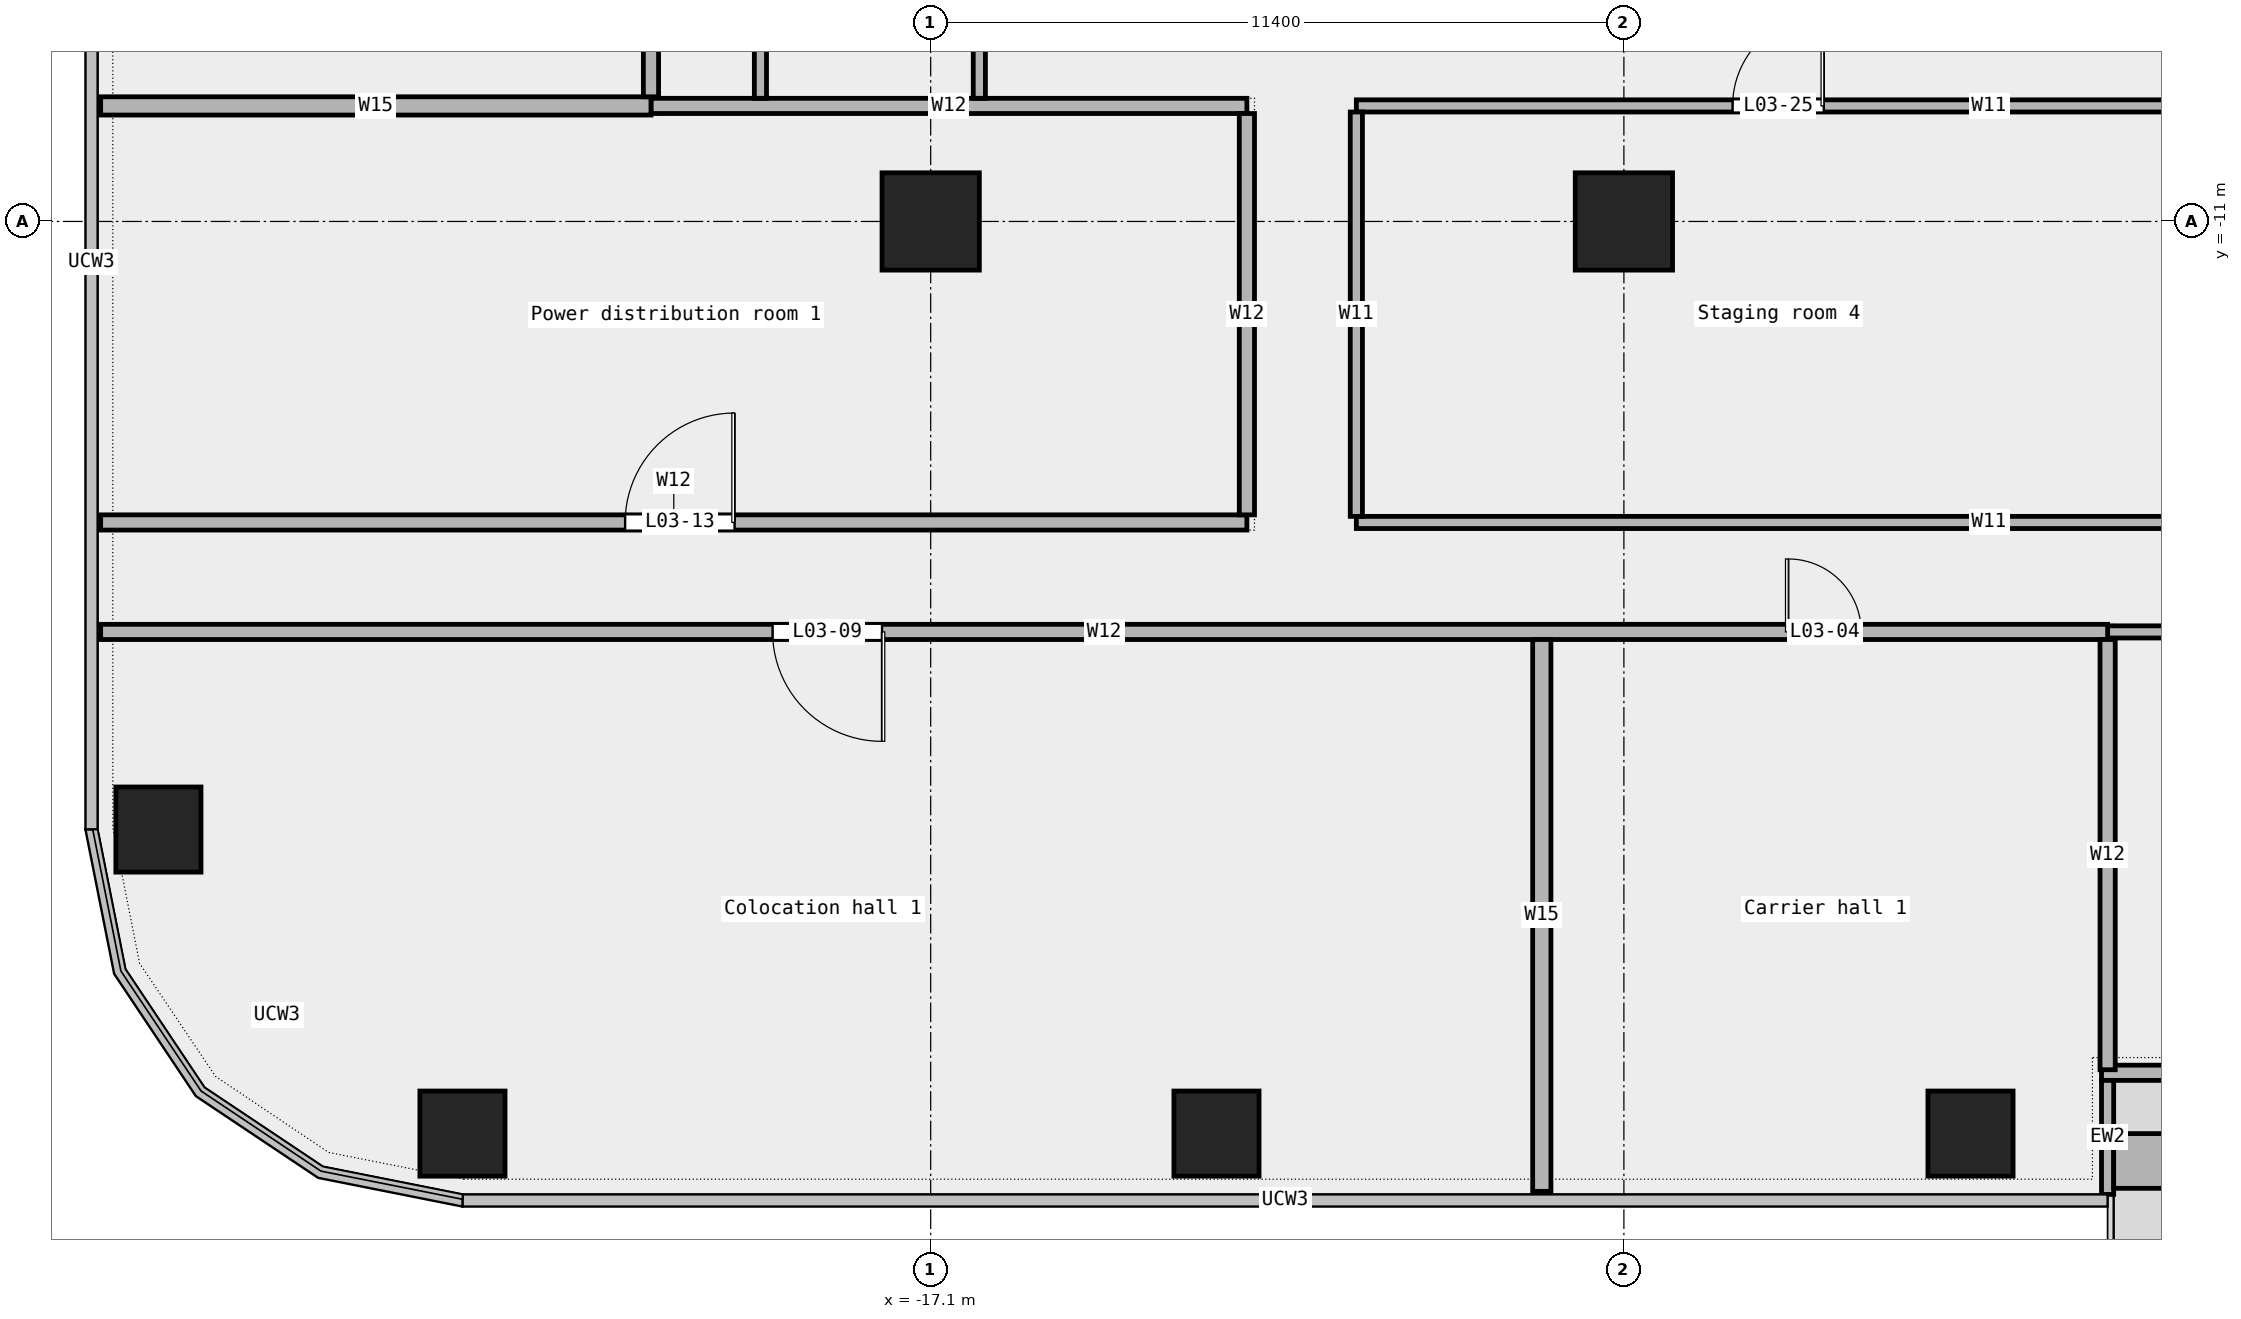
"""IFC4 building model, lengths in metres.
Left out: names, types, materials, properties, quantities, classifications, styles, units other than length and angle.
Written with IfcOpenShell. Run it as: python <this file> out.ifc"""

import sys

from ifc_helpers import new_model, si_unit, direction, frame, frame_2d, origin, origin_2d, place, context, subcontext, project, spatial, rectangle, extrude, element, fill, save


model = new_model("IFC4")
c1 = context("Model", 3, precision=1e-05, world=origin(), true_north=direction((0.0, 1.0)))
c2 = subcontext(c1, "Body", "Model", "MODEL_VIEW")
j1 = project(units=[si_unit("LENGTHUNIT", "METRE"), si_unit("PLANEANGLEUNIT", "RADIAN")], contexts=[c1])
p1 = place(None, origin())
s1 = spatial("IfcSite", under=j1, at=p1, CompositionType="ELEMENT")
p2 = place(p1, origin())
s2 = spatial("IfcBuilding", under=s1, at=p2, CompositionType="ELEMENT")
p3 = place(p2, frame((0.0, 0.0, 20.0)))
s3 = spatial("IfcBuildingStorey", under=s2, at=p3, CompositionType="ELEMENT", Elevation=20.0)
for number, where, z_axis, x_axis in (
    (1, (-24.8, -26.0, 0.0), (0.0, 0.0, 1.0), (1.0, 0.0, 0.0)),
    (2, (-12.4, -26.0, 0.0), (0.0, 0.0, 1.0), (1.0, 0.0, 0.0)),
    (3, (0.0, -26.0, 0.0), (0.0, 0.0, 1.0), (1.0, 0.0, 0.0)),
    (4, (-29.8, -21.0, 0.0), (0.0, 0.0, 1.0), (1.0, 0.0, 0.0)),
):
    element("IfcColumn", number, at=place(p3, frame(where, z_axis=z_axis, x_axis=x_axis)), inside=s3, PredefinedType="COLUMN", context=c2, shape_type="SweptSolid", body=[
        extrude(rectangle(XDim=1.4, YDim=1.4, at=origin_2d()), origin(), (0.0, 0.0, 1.0), 5.0),
    ])
for number, where, z_axis, x_axis in (
    (5, (-17.1, -11.0, 0.0), (0.0, 0.0, 1.0), (1.0, 0.0, 0.0)),
    (6, (-5.7, -11.0, 0.0), (0.0, 0.0, 1.0), (1.0, 0.0, 0.0)),
):
    element("IfcColumn", number, at=place(p3, frame(where, z_axis=z_axis, x_axis=x_axis)), inside=s3, PredefinedType="COLUMN", context=c2, shape_type="SweptSolid", body=[
        extrude(rectangle(XDim=1.6, YDim=1.6, at=origin_2d()), origin(), (0.0, 0.0, 1.0), 5.0),
    ])
p4 = place(p3, frame((2.155, -25.0, 0.0), z_axis=(0.0, 0.0, 1.0), x_axis=(1.0, 0.0, 0.0)))
e7 = element("IfcWall", 7, at=p4, inside=s3, PredefinedType="STANDARD", context=c2, shape_type="SweptSolid", body=[
    extrude(rectangle(XDim=13.727, YDim=0.25, at=frame_2d((6.864, 0.0))), origin(), (0.0, 0.0, 1.0), 5.0),
])
p5 = place(p4, frame((1.75, 0.0, 0.45)))
e8 = element("IfcOpeningElement", 8, at=p5, cuts=e7, PredefinedType="OPENING", context=c2, shape_type="SweptSolid", body=[
    extrude(rectangle(XDim=1.5, YDim=3.0, at=frame_2d((0.75, 1.5))), frame((0.0, 0.137, 0.0), z_axis=(0.0, -1.0, 0.0), x_axis=(1.0, 0.0, 0.0)), (0.0, 0.0, 1.0), 0.274),
])
p6 = place(p4, frame((6.0, 0.0, 0.0)))
e9 = element("IfcOpeningElement", 9, at=p6, cuts=e7, PredefinedType="OPENING", context=c2, shape_type="SweptSolid", body=[
    extrude(rectangle(XDim=1.8, YDim=2.4, at=frame_2d((0.9, 1.2))), frame((0.0, 0.137, 0.0), z_axis=(0.0, -1.0, 0.0), x_axis=(1.0, 0.0, 0.0)), (0.0, 0.0, 1.0), 0.274),
])
p7 = place(p4, frame((11.25, 0.0, 0.45)))
e10 = element("IfcOpeningElement", 10, at=p7, cuts=e7, PredefinedType="OPENING", context=c2, shape_type="SweptSolid", body=[
    extrude(rectangle(XDim=1.5, YDim=3.0, at=frame_2d((0.75, 1.5))), frame((0.0, 0.137, 0.0), z_axis=(0.0, -1.0, 0.0), x_axis=(1.0, 0.0, 0.0)), (0.0, 0.0, 1.0), 0.274),
])
p8 = place(p3, frame((2.255, -27.0, 0.0), z_axis=(0.0, 0.0, 1.0), x_axis=(0.0, 1.0, 0.0)))
e11 = element("IfcWall", 11, at=p8, inside=s3, PredefinedType="STANDARD", context=c2, shape_type="SweptSolid", body=[
    extrude(rectangle(XDim=1.875, YDim=0.2, at=frame_2d((0.938, 0.0))), origin(), (0.0, 0.0, 1.0), 5.0),
])
p9 = place(p3, frame((2.354, -26.45, 0.0), z_axis=(0.0, 0.0, 1.0), x_axis=(1.0, 0.0, 0.0)))
e12 = element("IfcWall", 12, at=p9, inside=s3, PredefinedType="STANDARD", context=c2, shape_type="SweptSolid", body=[
    extrude(rectangle(XDim=3.6, YDim=0.9, at=frame_2d((1.8, 0.0))), origin(), (0.0, 0.0, 1.0), 0.7),
])
p10 = place(p3, frame((2.255, -17.75, 0.0), z_axis=(0.0, 0.0, 1.0), x_axis=(1.0, 0.0, 0.0)))
e13 = element("IfcWall", 13, at=p10, inside=s3, PredefinedType="PARTITIONING", context=c2, shape_type="SweptSolid", body=[
    extrude(rectangle(XDim=13.525, YDim=0.2, at=frame_2d((6.763, 0.0))), origin(), (0.0, 0.0, 1.0), 5.0),
])
p11 = place(p10, frame((6.012, 0.0, 0.0)))
e14 = element("IfcOpeningElement", 14, at=p11, cuts=e13, PredefinedType="OPENING", context=c2, shape_type="SweptSolid", body=[
    extrude(rectangle(XDim=1.5, YDim=2.1, at=frame_2d((0.75, 1.05))), frame((0.0, 0.112, 0.0), z_axis=(0.0, -1.0, 0.0), x_axis=(1.0, 0.0, 0.0)), (0.0, 0.0, 1.0), 0.224),
])
p12 = place(p3, frame((-30.75, -17.75, 0.0), z_axis=(0.0, 0.0, 1.0), x_axis=(1.0, 0.0, 0.0)))
e15 = element("IfcWall", 15, at=p12, inside=s3, PredefinedType="PARTITIONING", context=c2, shape_type="SweptSolid", body=[
    extrude(rectangle(XDim=33.005, YDim=0.25, at=frame_2d((16.502, 0.0))), origin(), (0.0, 0.0, 1.0), 5.0),
])
p13 = place(p12, frame((27.752, 0.0, 0.0)))
e16 = element("IfcOpeningElement", 16, at=p13, cuts=e15, PredefinedType="OPENING", context=c2, shape_type="SweptSolid", body=[
    extrude(rectangle(XDim=1.2, YDim=2.1, at=frame_2d((0.6, 1.05))), frame((0.0, 0.137, 0.0), z_axis=(0.0, -1.0, 0.0), x_axis=(1.0, 0.0, 0.0)), (0.0, 0.0, 1.0), 0.274),
])
p14 = place(p12, frame((11.05, 0.0, 0.0)))
e17 = element("IfcOpeningElement", 17, at=p14, cuts=e15, PredefinedType="OPENING", context=c2, shape_type="SweptSolid", body=[
    extrude(rectangle(XDim=1.8, YDim=2.1, at=frame_2d((0.9, 1.05))), frame((0.0, 0.137, 0.0), z_axis=(0.0, -1.0, 0.0), x_axis=(1.0, 0.0, 0.0)), (0.0, 0.0, 1.0), 0.274),
])
p15 = place(p3, frame((-10.1, -15.95, 0.0), z_axis=(0.0, 0.0, 1.0), x_axis=(1.0, 0.0, 0.0)))
e18 = element("IfcWall", 18, at=p15, inside=s3, PredefinedType="PARTITIONING", context=c2, shape_type="SweptSolid", body=[
    extrude(rectangle(XDim=20.81, YDim=0.2, at=frame_2d((10.405, 0.0))), origin(), (0.0, 0.0, 1.0), 5.0),
])
p16 = place(p3, frame((-30.75, -15.95, 0.0), z_axis=(0.0, 0.0, 1.0), x_axis=(1.0, 0.0, 0.0)))
e19 = element("IfcWall", 19, at=p16, inside=s3, PredefinedType="PARTITIONING", context=c2, shape_type="SweptSolid", body=[
    extrude(rectangle(XDim=18.85, YDim=0.25, at=frame_2d((9.425, 0.0))), origin(), (0.0, 0.0, 1.0), 5.0),
])
p17 = place(p16, frame((8.625, 0.0, 0.0)))
e20 = element("IfcOpeningElement", 20, at=p17, cuts=e19, PredefinedType="OPENING", context=c2, shape_type="SweptSolid", body=[
    extrude(rectangle(XDim=1.8, YDim=2.1, at=frame_2d((0.9, 1.05))), frame((0.0, 0.137, 0.0), z_axis=(0.0, -1.0, 0.0), x_axis=(1.0, 0.0, 0.0)), (0.0, 0.0, 1.0), 0.274),
])
p18 = place(p3, frame((-10.1, -9.1, 0.0), z_axis=(0.0, 0.0, 1.0), x_axis=(1.0, 0.0, 0.0)))
e21 = element("IfcWall", 21, at=p18, inside=s3, PredefinedType="PARTITIONING", context=c2, shape_type="SweptSolid", body=[
    extrude(rectangle(XDim=20.81, YDim=0.2, at=frame_2d((10.405, 0.0))), origin(), (0.0, 0.0, 1.0), 5.0),
])
p19 = place(p18, frame((16.742, 0.0, 0.0)))
e22 = element("IfcOpeningElement", 22, at=p19, cuts=e21, PredefinedType="OPENING", context=c2, shape_type="SweptSolid", body=[
    extrude(rectangle(XDim=1.2, YDim=2.1, at=frame_2d((0.6, 1.05))), frame((0.0, 0.112, 0.0), z_axis=(0.0, -1.0, 0.0), x_axis=(1.0, 0.0, 0.0)), (0.0, 0.0, 1.0), 0.224),
])
p20 = place(p18, frame((6.188, 0.0, 0.0)))
e23 = element("IfcOpeningElement", 23, at=p20, cuts=e21, PredefinedType="OPENING", context=c2, shape_type="SweptSolid", body=[
    extrude(rectangle(XDim=1.5, YDim=2.1, at=frame_2d((0.75, 1.05))), frame((0.0, 0.112, 0.0), z_axis=(0.0, -1.0, 0.0), x_axis=(1.0, 0.0, 0.0)), (0.0, 0.0, 1.0), 0.224),
])
p21 = place(p3, frame((-21.7, -9.1, 0.0), z_axis=(0.0, 0.0, 1.0), x_axis=(1.0, 0.0, 0.0)))
e24 = element("IfcWall", 24, at=p21, inside=s3, PredefinedType="PARTITIONING", context=c2, shape_type="SweptSolid", body=[
    extrude(rectangle(XDim=9.8, YDim=0.25, at=frame_2d((4.9, 0.0))), origin(), (0.0, 0.0, 1.0), 5.0),
])
p22 = place(p3, frame((-30.75, -9.1, 0.0), z_axis=(0.0, 0.0, 1.0), x_axis=(1.0, 0.0, 0.0)))
e25 = element("IfcWall", 25, at=p22, inside=s3, PredefinedType="PARTITIONING", context=c2, shape_type="SweptSolid", body=[
    extrude(rectangle(XDim=9.05, YDim=0.3, at=frame_2d((4.525, 0.0))), origin(), (0.0, 0.0, 1.0), 5.0),
])
p23 = place(p3, frame((-21.7, -8.95, 0.0), z_axis=(0.0, 0.0, 1.0), x_axis=(0.0, 1.0, 0.0)))
e26 = element("IfcWall", 26, at=p23, inside=s3, PredefinedType="PARTITIONING", context=c2, shape_type="SweptSolid", body=[
    extrude(rectangle(XDim=6.49, YDim=0.25, at=frame_2d((3.245, 0.0))), origin(), (0.0, 0.0, 1.0), 5.0),
])
p24 = place(p23, frame((2.645, 0.0, 0.0)))
e27 = element("IfcOpeningElement", 27, at=p24, cuts=e26, PredefinedType="OPENING", context=c2, shape_type="SweptSolid", body=[
    extrude(rectangle(XDim=1.2, YDim=2.1, at=frame_2d((0.6, 1.05))), frame((0.0, 0.137, 0.0), z_axis=(0.0, -1.0, 0.0), x_axis=(1.0, 0.0, 0.0)), (0.0, 0.0, 1.0), 0.274),
])
p25 = place(p3, frame((-19.9, -8.975, 0.0), z_axis=(0.0, 0.0, 1.0), x_axis=(0.0, 1.0, 0.0)))
e28 = element("IfcWall", 28, at=p25, inside=s3, PredefinedType="PARTITIONING", context=c2, shape_type="SweptSolid", body=[
    extrude(rectangle(XDim=5.425, YDim=0.2, at=frame_2d((2.712, 0.0))), origin(), (0.0, 0.0, 1.0), 5.0),
])
p26 = place(p3, frame((-16.3, -8.975, 0.0), z_axis=(0.0, 0.0, 1.0), x_axis=(0.0, 1.0, 0.0)))
e29 = element("IfcWall", 29, at=p26, inside=s3, PredefinedType="PARTITIONING", context=c2, shape_type="SweptSolid", body=[
    extrude(rectangle(XDim=5.425, YDim=0.2, at=frame_2d((2.712, 0.0))), origin(), (0.0, 0.0, 1.0), 5.0),
])
p27 = place(p26, frame((2.262, 0.0, 0.0)))
e30 = element("IfcOpeningElement", 30, at=p27, cuts=e29, PredefinedType="OPENING", context=c2, shape_type="SweptSolid", body=[
    extrude(rectangle(XDim=0.9, YDim=2.1, at=frame_2d((0.45, 1.05))), frame((0.0, 0.112, 0.0), z_axis=(0.0, -1.0, 0.0), x_axis=(1.0, 0.0, 0.0)), (0.0, 0.0, 1.0), 0.224),
])
p28 = place(p3, frame((-11.9, -15.825, 0.0), z_axis=(0.0, 0.0, 1.0), x_axis=(0.0, 1.0, 0.0)))
e31 = element("IfcWall", 31, at=p28, inside=s3, PredefinedType="PARTITIONING", context=c2, shape_type="SweptSolid", body=[
    extrude(rectangle(XDim=6.6, YDim=0.25, at=frame_2d((3.3, 0.0))), origin(), (0.0, 0.0, 1.0), 5.0),
])
p29 = place(p3, frame((-10.1, -15.85, 0.0), z_axis=(0.0, 0.0, 1.0), x_axis=(0.0, 1.0, 0.0)))
e32 = element("IfcWall", 32, at=p29, inside=s3, PredefinedType="PARTITIONING", context=c2, shape_type="SweptSolid", body=[
    extrude(rectangle(XDim=6.65, YDim=0.2, at=frame_2d((3.325, 0.0))), origin(), (0.0, 0.0, 1.0), 5.0),
])
p30 = place(p3, frame((-7.05, -26.95, 0.0), z_axis=(0.0, 0.0, 1.0), x_axis=(0.0, 1.0, 0.0)))
e33 = element("IfcWall", 33, at=p30, inside=s3, PredefinedType="PARTITIONING", context=c2, shape_type="SweptSolid", body=[
    extrude(rectangle(XDim=9.075, YDim=0.3, at=frame_2d((4.538, 0.0))), origin(), (0.0, 0.0, 1.0), 5.0),
])
p31 = place(p3, frame((2.255, -24.95, 0.0), z_axis=(0.0, 0.0, 1.0), x_axis=(0.0, 1.0, 0.0)))
e34 = element("IfcWall", 34, at=p31, inside=s3, PredefinedType="PARTITIONING", context=c2, shape_type="SweptSolid", body=[
    extrude(rectangle(XDim=7.075, YDim=0.25, at=frame_2d((3.538, 0.0))), origin(), (0.0, 0.0, 1.0), 5.0),
])
p32 = place(p13, origin())
e35 = element("IfcDoor", 35, at=p32, inside=s3, OperationType="SINGLE_SWING_LEFT", PredefinedType="DOOR", context=c2, shape_type="SweptSolid", body=[
    extrude(rectangle(XDim=1.2, YDim=2.1, at=frame_2d((0.6, 1.05))), frame((0.0, 0.025, 0.0), z_axis=(0.0, -1.0, 0.0), x_axis=(1.0, 0.0, 0.0)), (0.0, 0.0, 1.0), 0.05),
])
fill(e16, e35)
p33 = place(p14, origin())
e36 = element("IfcDoor", 36, at=p33, inside=s3, OperationType="DOUBLE_DOOR_SINGLE_SWING", PredefinedType="DOOR", context=c2, shape_type="SweptSolid", body=[
    extrude(rectangle(XDim=1.8, YDim=2.1, at=frame_2d((0.9, 1.05))), frame((0.0, 0.025, 0.0), z_axis=(0.0, -1.0, 0.0), x_axis=(1.0, 0.0, 0.0)), (0.0, 0.0, 1.0), 0.05),
])
fill(e17, e36)
p34 = place(p17, origin())
e37 = element("IfcDoor", 37, at=p34, inside=s3, OperationType="DOUBLE_DOOR_SINGLE_SWING", PredefinedType="DOOR", context=c2, shape_type="SweptSolid", body=[
    extrude(rectangle(XDim=1.8, YDim=2.1, at=frame_2d((0.9, 1.05))), frame((0.0, 0.025, 0.0), z_axis=(0.0, -1.0, 0.0), x_axis=(1.0, 0.0, 0.0)), (0.0, 0.0, 1.0), 0.05),
])
fill(e20, e37)
p35 = place(p20, origin())
e38 = element("IfcDoor", 38, at=p35, inside=s3, OperationType="DOUBLE_DOOR_SINGLE_SWING", PredefinedType="DOOR", context=c2, shape_type="SweptSolid", body=[
    extrude(rectangle(XDim=1.5, YDim=2.1, at=frame_2d((0.75, 1.05))), frame((0.0, 0.025, 0.0), z_axis=(0.0, -1.0, 0.0), x_axis=(1.0, 0.0, 0.0)), (0.0, 0.0, 1.0), 0.05),
])
fill(e23, e38)
save(model, sys.argv[1])
